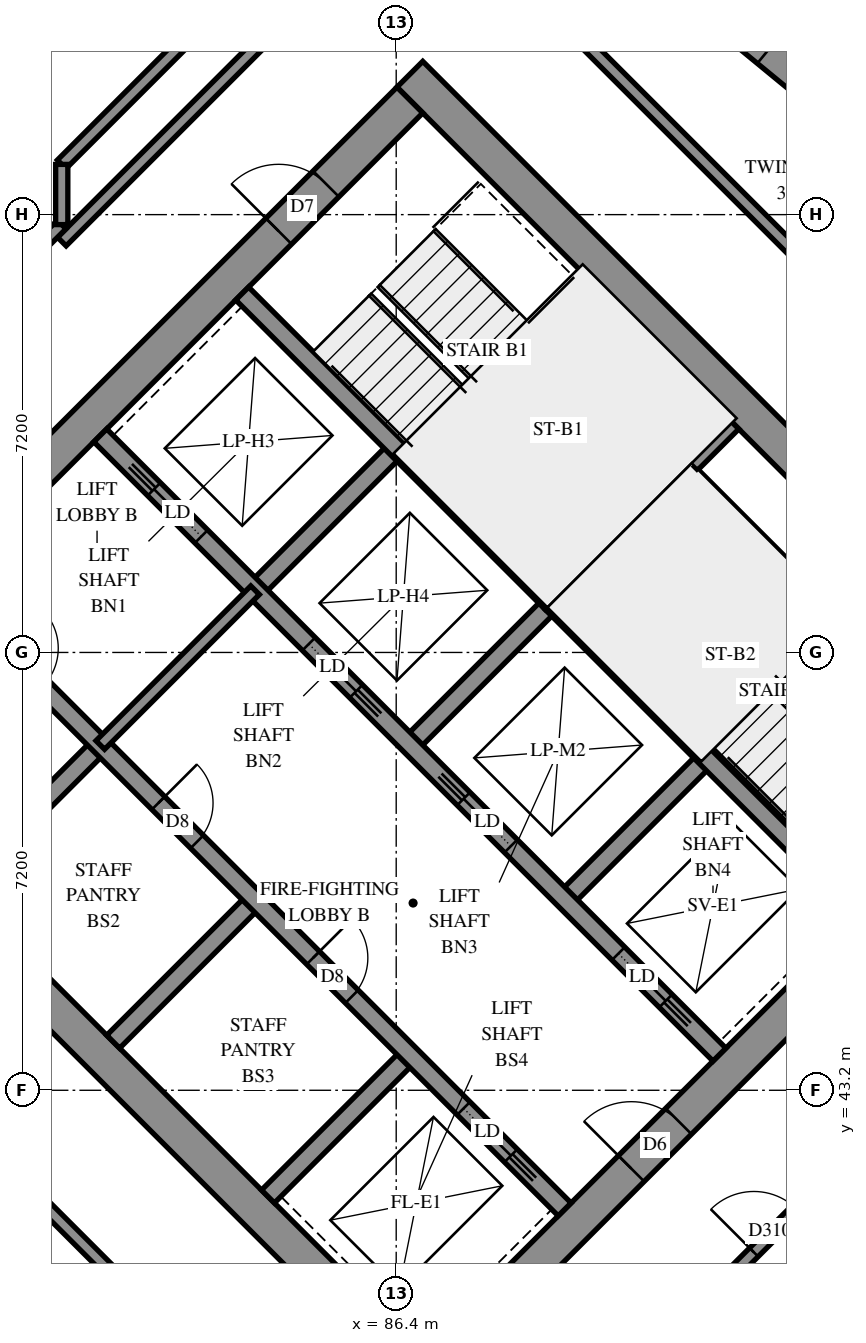
"""IFC4 building model, lengths in metres.
Left out: names, types, materials, properties, quantities, classifications, styles, units other than length and angle.
Written with IfcOpenShell. Run it as: python <this file> out.ifc"""

import sys

from ifc_helpers import new_model, si_unit, direction, frame, frame_2d, origin, place, context, subcontext, project, spatial, polyline, rectangle, outline, extrude, element, fill, save


model = new_model("IFC4")
c1 = context("Model", 3, precision=1e-05, world=origin(), true_north=direction((0.0, 1.0)))
c2 = subcontext(c1, "Body", "Model", "MODEL_VIEW")
j1 = project(units=[si_unit("LENGTHUNIT", "METRE"), si_unit("PLANEANGLEUNIT", "RADIAN")], contexts=[c1])
p1 = place(None, origin())
s1 = spatial("IfcSite", under=j1, at=p1, CompositionType="ELEMENT")
p2 = place(p1, origin())
s2 = spatial("IfcBuilding", under=s1, at=p2, CompositionType="ELEMENT")
p3 = place(p2, frame((0.0, 0.0, 138.8)))
s3 = spatial("IfcBuildingStorey", under=s2, at=p3, CompositionType="ELEMENT", Elevation=138.8)
p4 = place(p3, frame((76.018, 49.302, -0.3), z_axis=(0.0, 0.0, 1.0), x_axis=(0.7071067812, -0.7071067812, 0.0)))
e1 = element("IfcWall", 1, at=p4, inside=s3, PredefinedType="SHEAR", context=c2, shape_type="SweptSolid", body=[
    extrude(rectangle(XDim=15.6, YDim=0.6, at=frame_2d((7.8, 0.0))), origin(), (0.0, 0.0, 1.0), 2.7),
])
p5 = place(p3, frame((86.625, 59.908, -0.3), z_axis=(0.0, 0.0, 1.0), x_axis=(0.7071067812, -0.7071067812, 0.0)))
e2 = element("IfcWall", 2, at=p5, inside=s3, PredefinedType="SHEAR", context=c2, shape_type="SweptSolid", body=[
    extrude(rectangle(XDim=15.6, YDim=0.6, at=frame_2d((7.8, 0.0))), origin(), (0.0, 0.0, 1.0), 2.7),
])
p6 = place(p5, frame((10.6, 0.0, 0.3)))
e3 = element("IfcOpeningElement", 3, at=p6, cuts=e2, PredefinedType="OPENING", context=c2, shape_type="SweptSolid", body=[
    extrude(rectangle(XDim=0.8, YDim=2.1, at=frame_2d((0.4, 1.05))), frame((0.0, 0.31, 0.0), z_axis=(0.0, -1.0, 0.0), x_axis=(1.0, 0.0, 0.0)), (0.0, 0.0, 1.0), 0.62),
])
p7 = place(p3, frame((76.442, 49.302, -0.3), z_axis=(0.0, 0.0, 1.0), x_axis=(0.7071067812, 0.7071067812, 0.0)))
e4 = element("IfcWall", 4, at=p7, inside=s3, PredefinedType="SHEAR", context=c2, shape_type="SweptSolid", body=[
    extrude(rectangle(XDim=14.4, YDim=0.6, at=frame_2d((7.2, 0.0))), origin(), (0.0, 0.0, 1.0), 2.7),
])
p8 = place(p7, frame((4.55, 0.0, 0.3)))
e5 = element("IfcOpeningElement", 5, at=p8, cuts=e4, PredefinedType="OPENING", context=c2, shape_type="SweptSolid", body=[
    extrude(rectangle(XDim=1.1, YDim=2.1, at=frame_2d((0.55, 1.05))), frame((0.0, 0.31, 0.0), z_axis=(0.0, -1.0, 0.0), x_axis=(1.0, 0.0, 0.0)), (0.0, 0.0, 1.0), 0.62),
])
p9 = place(p7, frame((11.35, 0.0, 0.3)))
e6 = element("IfcOpeningElement", 6, at=p9, cuts=e4, PredefinedType="OPENING", context=c2, shape_type="SweptSolid", body=[
    extrude(rectangle(XDim=1.1, YDim=2.1, at=frame_2d((0.55, 1.05))), frame((0.0, 0.31, 0.0), z_axis=(0.0, -1.0, 0.0), x_axis=(1.0, 0.0, 0.0)), (0.0, 0.0, 1.0), 0.62),
])
p10 = place(p3, frame((87.049, 38.695, -0.3), z_axis=(0.0, 0.0, 1.0), x_axis=(0.7071067812, 0.7071067812, 0.0)))
e7 = element("IfcWall", 7, at=p10, inside=s3, PredefinedType="SHEAR", context=c2, shape_type="SweptSolid", body=[
    extrude(rectangle(XDim=14.4, YDim=0.6, at=frame_2d((7.2, 0.0))), origin(), (0.0, 0.0, 1.0), 2.7),
])
p11 = place(p10, frame((4.55, 0.0, 0.3)))
e8 = element("IfcOpeningElement", 8, at=p11, cuts=e7, PredefinedType="OPENING", context=c2, shape_type="SweptSolid", body=[
    extrude(rectangle(XDim=1.1, YDim=2.1, at=frame_2d((0.55, 1.05))), frame((0.0, 0.31, 0.0), z_axis=(0.0, -1.0, 0.0), x_axis=(1.0, 0.0, 0.0)), (0.0, 0.0, 1.0), 0.62),
])
p12 = place(p10, frame((11.35, 0.0, 0.3)))
e9 = element("IfcOpeningElement", 9, at=p12, cuts=e7, PredefinedType="OPENING", context=c2, shape_type="SweptSolid", body=[
    extrude(rectangle(XDim=1.1, YDim=2.1, at=frame_2d((0.55, 1.05))), frame((0.0, 0.31, 0.0), z_axis=(0.0, -1.0, 0.0), x_axis=(1.0, 0.0, 0.0)), (0.0, 0.0, 1.0), 0.62),
])
for number, where, z_axis, x_axis in (
    (10, (79.2, 46.544, 0.0), (0.0, 0.0, 1.0), (0.707, 0.707, 0.0)),
    (11, (84.079, 51.423, 0.0), (0.0, 0.0, 1.0), (0.707, 0.707, 0.0)),
):
    element("IfcWall", number, at=place(p3, frame(where, z_axis=z_axis, x_axis=x_axis)), inside=s3, PredefinedType="SOLIDWALL", context=c2, shape_type="SweptSolid", body=[
        extrude(rectangle(XDim=3.3, YDim=0.3, at=frame_2d((1.65, 0.0))), origin(), (0.0, 0.0, 1.0), 3.1),
    ])
p13 = place(p3, frame((81.746, 43.999, 0.0), z_axis=(0.0, 0.0, 1.0), x_axis=(0.7071067812, 0.7071067812, 0.0)))
e12 = element("IfcWall", 12, at=p13, inside=s3, PredefinedType="SOLIDWALL", context=c2, shape_type="SweptSolid", body=[
    extrude(rectangle(XDim=3.3, YDim=0.3, at=frame_2d((1.65, 0.0))), origin(), (0.0, 0.0, 1.0), 3.1),
])
p14 = place(p3, frame((86.625, 48.878, 0.0), z_axis=(0.0, 0.0, 1.0), x_axis=(0.7071067812, 0.7071067812, 0.0)))
e13 = element("IfcWall", 13, at=p14, inside=s3, PredefinedType="SOLIDWALL", context=c2, shape_type="SweptSolid", body=[
    extrude(rectangle(XDim=3.3, YDim=0.3, at=frame_2d((1.65, 0.0))), origin(), (0.0, 0.0, 1.0), 3.1),
])
p15 = place(p3, frame((84.291, 41.453, 0.0), z_axis=(0.0, 0.0, 1.0), x_axis=(0.7071067812, 0.7071067812, 0.0)))
e14 = element("IfcWall", 14, at=p15, inside=s3, PredefinedType="SOLIDWALL", context=c2, shape_type="SweptSolid", body=[
    extrude(rectangle(XDim=3.3, YDim=0.3, at=frame_2d((1.65, 0.0))), origin(), (0.0, 0.0, 1.0), 3.1),
])
p16 = place(p3, frame((89.17, 46.332, 0.0), z_axis=(0.0, 0.0, 1.0), x_axis=(0.7071067812, 0.7071067812, 0.0)))
e15 = element("IfcWall", 15, at=p16, inside=s3, PredefinedType="SOLIDWALL", context=c2, shape_type="SweptSolid", body=[
    extrude(rectangle(XDim=3.3, YDim=0.3, at=frame_2d((1.65, 0.0))), origin(), (0.0, 0.0, 1.0), 3.1),
])
p17 = place(p3, frame((78.988, 51.423, 0.0), z_axis=(0.0, 0.0, 1.0), x_axis=(0.7071067812, -0.7071067812, 0.0)))
e16 = element("IfcWall", 16, at=p17, inside=s3, PredefinedType="SOLIDWALL", context=c2, shape_type="SweptSolid", body=[
    extrude(rectangle(XDim=14.4, YDim=0.3, at=frame_2d((7.2, 0.0))), origin(), (0.0, 0.0, 1.0), 3.1),
])
p18 = place(p17, frame((1.35, 0.0, 0.0)))
e17 = element("IfcOpeningElement", 17, at=p18, cuts=e16, PredefinedType="OPENING", context=c2, shape_type="SweptSolid", body=[
    extrude(rectangle(XDim=0.9, YDim=2.1, at=frame_2d((0.45, 1.05))), frame((0.0, 0.16, 0.0), z_axis=(0.0, -1.0, 0.0), x_axis=(1.0, 0.0, 0.0)), (0.0, 0.0, 1.0), 0.32),
])
p19 = place(p17, frame((4.95, 0.0, 0.0)))
e18 = element("IfcOpeningElement", 18, at=p19, cuts=e16, PredefinedType="OPENING", context=c2, shape_type="SweptSolid", body=[
    extrude(rectangle(XDim=0.9, YDim=2.1, at=frame_2d((0.45, 1.05))), frame((0.0, 0.16, 0.0), z_axis=(0.0, -1.0, 0.0), x_axis=(1.0, 0.0, 0.0)), (0.0, 0.0, 1.0), 0.32),
])
p20 = place(p17, frame((8.55, 0.0, 0.0)))
e19 = element("IfcOpeningElement", 19, at=p20, cuts=e16, PredefinedType="OPENING", context=c2, shape_type="SweptSolid", body=[
    extrude(rectangle(XDim=0.9, YDim=2.1, at=frame_2d((0.45, 1.05))), frame((0.0, 0.16, 0.0), z_axis=(0.0, -1.0, 0.0), x_axis=(1.0, 0.0, 0.0)), (0.0, 0.0, 1.0), 0.32),
])
p21 = place(p17, frame((12.05, 0.0, 0.0)))
e20 = element("IfcOpeningElement", 20, at=p21, cuts=e16, PredefinedType="OPENING", context=c2, shape_type="SweptSolid", body=[
    extrude(rectangle(XDim=1.1, YDim=2.1, at=frame_2d((0.55, 1.05))), frame((0.0, 0.16, 0.0), z_axis=(0.0, -1.0, 0.0), x_axis=(1.0, 0.0, 0.0)), (0.0, 0.0, 1.0), 0.32),
])
p22 = place(p3, frame((81.534, 53.969, 0.0), z_axis=(0.0, 0.0, 1.0), x_axis=(0.707103309, -0.7071102534, 0.0)))
e21 = element("IfcWall", 21, at=p22, inside=s3, PredefinedType="SOLIDWALL", context=c2, shape_type="SweptSolid", body=[
    extrude(rectangle(XDim=14.4, YDim=0.3, at=frame_2d((7.2, 0.0))), origin(), (0.0, 0.0, 1.0), 3.1),
])
p23 = place(p22, frame((1.25, 0.0, 0.0)))
e22 = element("IfcOpeningElement", 22, at=p23, cuts=e21, PredefinedType="OPENING", context=c2, shape_type="SweptSolid", body=[
    extrude(rectangle(XDim=1.1, YDim=2.1, at=frame_2d((0.55, 1.05))), frame((0.0, 0.16, 0.0), z_axis=(0.0, -1.0, 0.0), x_axis=(1.0, 0.0, 0.0)), (0.0, 0.0, 1.0), 0.32),
])
p24 = place(p22, frame((4.85, 0.0, 0.0)))
e23 = element("IfcOpeningElement", 23, at=p24, cuts=e21, PredefinedType="OPENING", context=c2, shape_type="SweptSolid", body=[
    extrude(rectangle(XDim=1.1, YDim=2.1, at=frame_2d((0.55, 1.05))), frame((0.0, 0.16, 0.0), z_axis=(0.0, -1.0, 0.0), x_axis=(1.0, 0.0, 0.0)), (0.0, 0.0, 1.0), 0.32),
])
p25 = place(p22, frame((8.45, 0.0, 0.0)))
e24 = element("IfcOpeningElement", 24, at=p25, cuts=e21, PredefinedType="OPENING", context=c2, shape_type="SweptSolid", body=[
    extrude(rectangle(XDim=1.1, YDim=2.1, at=frame_2d((0.55, 1.05))), frame((0.0, 0.16, 0.0), z_axis=(0.0, -1.0, 0.0), x_axis=(1.0, 0.0, 0.0)), (0.0, 0.0, 1.0), 0.32),
])
p26 = place(p22, frame((12.05, 0.0, 0.0)))
e25 = element("IfcOpeningElement", 25, at=p26, cuts=e21, PredefinedType="OPENING", context=c2, shape_type="SweptSolid", body=[
    extrude(rectangle(XDim=1.1, YDim=2.1, at=frame_2d((0.55, 1.05))), frame((0.0, 0.16, 0.0), z_axis=(0.0, -1.0, 0.0), x_axis=(1.0, 0.0, 0.0)), (0.0, 0.0, 1.0), 0.32),
])
for number, where, z_axis, x_axis in (
    (26, (83.867, 56.302, 0.0), (0.0, 0.0, 1.0), (0.707, -0.707, 0.0)),
    (27, (88.958, 51.211, 0.0), (0.0, 0.0, 1.0), (0.707, -0.707, 0.0)),
):
    element("IfcWall", number, at=place(p3, frame(where, z_axis=z_axis, x_axis=x_axis)), inside=s3, PredefinedType="SOLIDWALL", context=c2, shape_type="SweptSolid", body=[
        extrude(rectangle(XDim=7.2, YDim=0.3, at=frame_2d((3.6, 0.0))), origin(), (0.0, 0.0, 1.0), 3.1),
    ])
p27 = place(p3, frame((88.958, 51.211, 0.0), z_axis=(0.0, 0.0, 1.0), x_axis=(0.7071067812, 0.7071067812, 0.0)))
e28 = element("IfcWall", 28, at=p27, inside=s3, PredefinedType="SOLIDWALL", context=c2, shape_type="SweptSolid", body=[
    extrude(rectangle(XDim=4.2, YDim=0.3, at=frame_2d((2.1, 0.0))), origin(), (0.0, 0.0, 1.0), 3.1),
])
p28 = place(p3, frame((93.793, 59.215, 0.0), z_axis=(0.0, 0.0, 1.0), x_axis=(-0.7725898055, 0.6349054988, 0.0)))
e29 = element("IfcWall", 29, at=p28, inside=s3, PredefinedType="SOLIDWALL", context=c2, shape_type="SweptSolid", body=[
    extrude(outline(polyline([(-0.025, -0.25), (3.365, -0.25), (3.414, 0.25), (0.025, 0.25), (-0.025, -0.25)])), origin(), (0.0, 0.0, 1.0), 3.1),
])
p29 = place(p28, frame((1.677, 0.0, 0.45)))
e30 = element("IfcOpeningElement", 30, at=p29, cuts=e29, PredefinedType="OPENING", context=c2, shape_type="SweptSolid", body=[
    extrude(rectangle(XDim=1.2, YDim=2.5, at=frame_2d((0.6, 1.25))), frame((0.0, 0.26, 0.0), z_axis=(0.0, -1.0, 0.0), x_axis=(1.0, 0.0, 0.0)), (0.0, 0.0, 1.0), 0.52),
])
p30 = place(p3, frame((91.313, 53.354, 0.0), z_axis=(0.0, 0.0, 1.0), x_axis=(0.7071140275, -0.7070995348, 0.0)))
e31 = element("IfcWall", 31, at=p30, inside=s3, PredefinedType="PARTITIONING", context=c2, shape_type="SweptSolid", body=[
    extrude(rectangle(XDim=6.9, YDim=0.15, at=frame_2d((3.45, 0.0))), origin(), (0.0, 0.0, 1.0), 3.1),
])
p31 = place(p3, frame((81.534, 48.878, 0.0), z_axis=(0.0, 0.0, 1.0), x_axis=(0.707092892, 0.7071206701, 0.0)))
e32 = element("IfcWall", 32, at=p31, inside=s3, PredefinedType="PARTITIONING", context=c2, shape_type="SweptSolid", body=[
    extrude(rectangle(XDim=3.6, YDim=0.2, at=frame_2d((1.8, 0.0))), origin(), (0.0, 0.0, 1.0), 3.1),
])
p32 = place(p3, frame((86.331, 33.312, 0.0), z_axis=(0.0, 0.0, 1.0), x_axis=(0.7071067812, 0.7071067812, 0.0)))
e33 = element("IfcWall", 33, at=p32, inside=s3, PredefinedType="PARTITIONING", context=c2, shape_type="SweptSolid", body=[
    extrude(rectangle(XDim=10.514, YDim=0.2, at=frame_2d((5.257, 0.0))), origin(), (0.0, 0.0, 1.0), 3.1),
])
p33 = place(p3, frame((88.326, 61.609, 0.0), z_axis=(0.0, 0.0, 1.0), x_axis=(0.7071067812, -0.7071067812, 0.0)))
e34 = element("IfcWall", 34, at=p33, inside=s3, PredefinedType="PARTITIONING", context=c2, shape_type="SweptSolid", body=[
    extrude(rectangle(XDim=10.14, YDim=0.2, at=frame_2d((5.07, 0.0))), origin(), (0.0, 0.0, 1.0), 3.1),
])
p34 = place(p33, frame((8.535, 0.0, 0.0)))
e35 = element("IfcOpeningElement", 35, at=p34, cuts=e34, PredefinedType="OPENING", context=c2, shape_type="SweptSolid", body=[
    extrude(rectangle(XDim=0.9, YDim=2.1, at=frame_2d((0.45, 1.05))), frame((0.0, 0.11, 0.0), z_axis=(0.0, -1.0, 0.0), x_axis=(1.0, 0.0, 0.0)), (0.0, 0.0, 1.0), 0.22),
])
p35 = place(p3, frame((80.899, 58.427, 0.0), z_axis=(0.0, 0.0, 1.0), x_axis=(0.7071121886, 0.7071013737, 0.0)))
e36 = element("IfcWall", 36, at=p35, inside=s3, PredefinedType="PARTITIONING", context=c2, shape_type="SweptSolid", body=[
    extrude(rectangle(XDim=9.246, YDim=0.2, at=frame_2d((4.623, 0.0))), origin(), (0.0, 0.0, 1.0), 3.1),
])
p36 = place(p3, frame((80.423, 41.497, 0.0), z_axis=(0.0, 0.0, 1.0), x_axis=(0.7071067812, -0.7071067812, 0.0)))
e37 = element("IfcWall", 37, at=p36, inside=s3, PredefinedType="PARTITIONING", context=c2, shape_type="SweptSolid", body=[
    extrude(rectangle(XDim=9.065, YDim=0.2, at=frame_2d((4.532, 0.0))), origin(), (0.0, 0.0, 1.0), 3.1),
])
p37 = place(p3, frame((86.837, 35.091, 0.0), z_axis=(0.0, 0.0, 1.0), x_axis=(0.7071067812, 0.7071067812, 0.0)))
e38 = element("IfcWall", 38, at=p37, inside=s3, PredefinedType="PARTITIONING", context=c2, shape_type="SweptSolid", body=[
    extrude(rectangle(XDim=8.898, YDim=0.2, at=frame_2d((4.449, 0.0))), origin(), (0.0, 0.0, 1.0), 3.1),
])
p38 = place(p37, frame((7.7, 0.0, 0.0)))
e39 = element("IfcOpeningElement", 39, at=p38, cuts=e38, PredefinedType="OPENING", context=c2, shape_type="SweptSolid", body=[
    extrude(rectangle(XDim=1.0, YDim=2.1, at=frame_2d((0.5, 1.05))), frame((0.0, 0.11, 0.0), z_axis=(0.0, -1.0, 0.0), x_axis=(1.0, 0.0, 0.0)), (0.0, 0.0, 1.0), 0.22),
])
p39 = place(p3, frame((80.901, 57.157, 0.0), z_axis=(0.0, 0.0, 1.0), x_axis=(0.7071067812, 0.7071067812, 0.0)))
e40 = element("IfcWall", 40, at=p39, inside=s3, PredefinedType="PARTITIONING", context=c2, shape_type="SweptSolid", body=[
    extrude(rectangle(XDim=8.392, YDim=0.2, at=frame_2d((4.196, 0.0))), origin(), (0.0, 0.0, 1.0), 3.1),
])
p40 = place(p3, frame((79.801, 56.339, 0.0), z_axis=(0.0, 0.0, 1.0), x_axis=(0.7071067812, 0.7071067812, 0.0)))
e41 = element("IfcWall", 41, at=p40, inside=s3, PredefinedType="PARTITIONING", context=c2, shape_type="SweptSolid", body=[
    extrude(rectangle(XDim=1.553, YDim=0.2, at=frame_2d((0.776, 0.0))), origin(), (0.0, 0.0, 1.0), 3.1),
])
p41 = place(p3, frame((80.9, 57.436, 0.0), z_axis=(0.0, 0.0, 1.0), x_axis=(0.0, 1.0, 0.0)))
e42 = element("IfcWall", 42, at=p41, inside=s3, PredefinedType="PARTITIONING", context=c2, shape_type="SweptSolid", body=[
    extrude(rectangle(XDim=0.99, YDim=0.2, at=frame_2d((0.495, 0.0))), origin(), (0.0, 0.0, 1.0), 3.1),
])
p42 = place(p29, origin())
e43 = element("IfcWindow", 43, at=p42, inside=s3, PartitioningType="SINGLE_PANEL", PredefinedType="WINDOW", context=c2, shape_type="SweptSolid", body=[
    extrude(rectangle(XDim=1.2, YDim=2.5, at=frame_2d((0.6, 1.25))), frame((0.0, 0.18, 0.0), z_axis=(0.0, -1.0, 0.0), x_axis=(1.0, 0.0, 0.0)), (0.0, 0.0, 1.0), 0.06),
])
fill(e30, e43)
p43 = place(p11, origin())
e44 = element("IfcDoor", 44, at=p43, inside=s3, OperationType="DOUBLE_DOOR_SINGLE_SWING", PredefinedType="DOOR", context=c2, shape_type="SweptSolid", body=[
    extrude(rectangle(XDim=1.1, YDim=2.1, at=frame_2d((0.55, 1.05))), frame((0.0, 0.025, 0.0), z_axis=(0.0, -1.0, 0.0), x_axis=(1.0, 0.0, 0.0)), (0.0, 0.0, 1.0), 0.05),
])
fill(e8, e44)
p44 = place(p9, origin())
e45 = element("IfcDoor", 45, at=p44, inside=s3, OperationType="SINGLE_SWING_LEFT", PredefinedType="DOOR", context=c2, shape_type="SweptSolid", body=[
    extrude(rectangle(XDim=1.1, YDim=2.1, at=frame_2d((0.55, 1.05))), frame((0.0, 0.025, 0.0), z_axis=(0.0, -1.0, 0.0), x_axis=(1.0, 0.0, 0.0)), (0.0, 0.0, 1.0), 0.05),
])
fill(e6, e45)
p45 = place(p19, origin())
e46 = element("IfcDoor", 46, at=p45, inside=s3, OperationType="SINGLE_SWING_LEFT", PredefinedType="DOOR", context=c2, shape_type="SweptSolid", body=[
    extrude(rectangle(XDim=0.9, YDim=2.1, at=frame_2d((0.45, 1.05))), frame((0.0, 0.025, 0.0), z_axis=(0.0, -1.0, 0.0), x_axis=(1.0, 0.0, 0.0)), (0.0, 0.0, 1.0), 0.05),
])
fill(e18, e46)
p46 = place(p20, origin())
e47 = element("IfcDoor", 47, at=p46, inside=s3, OperationType="SINGLE_SWING_LEFT", PredefinedType="DOOR", context=c2, shape_type="SweptSolid", body=[
    extrude(rectangle(XDim=0.9, YDim=2.1, at=frame_2d((0.45, 1.05))), frame((0.0, 0.025, 0.0), z_axis=(0.0, -1.0, 0.0), x_axis=(1.0, 0.0, 0.0)), (0.0, 0.0, 1.0), 0.05),
])
fill(e19, e47)
p47 = place(p21, origin())
e48 = element("IfcDoor", 48, at=p47, inside=s3, OperationType="SLIDING_TO_RIGHT", PredefinedType="DOOR", context=c2, shape_type="SweptSolid", body=[
    extrude(rectangle(XDim=1.1, YDim=2.1, at=frame_2d((0.55, 1.05))), frame((0.0, 0.025, 0.0), z_axis=(0.0, -1.0, 0.0), x_axis=(1.0, 0.0, 0.0)), (0.0, 0.0, 1.0), 0.05),
])
fill(e20, e48)
p48 = place(p23, origin())
e49 = element("IfcDoor", 49, at=p48, inside=s3, OperationType="SLIDING_TO_LEFT", PredefinedType="DOOR", context=c2, shape_type="SweptSolid", body=[
    extrude(rectangle(XDim=1.1, YDim=2.1, at=frame_2d((0.55, 1.05))), frame((0.0, 0.025, 0.0), z_axis=(0.0, -1.0, 0.0), x_axis=(1.0, 0.0, 0.0)), (0.0, 0.0, 1.0), 0.05),
])
fill(e22, e49)
p49 = place(p24, origin())
e50 = element("IfcDoor", 50, at=p49, inside=s3, OperationType="SLIDING_TO_RIGHT", PredefinedType="DOOR", context=c2, shape_type="SweptSolid", body=[
    extrude(rectangle(XDim=1.1, YDim=2.1, at=frame_2d((0.55, 1.05))), frame((0.0, 0.025, 0.0), z_axis=(0.0, -1.0, 0.0), x_axis=(1.0, 0.0, 0.0)), (0.0, 0.0, 1.0), 0.05),
])
fill(e23, e50)
p50 = place(p25, origin())
e51 = element("IfcDoor", 51, at=p50, inside=s3, OperationType="SLIDING_TO_LEFT", PredefinedType="DOOR", context=c2, shape_type="SweptSolid", body=[
    extrude(rectangle(XDim=1.1, YDim=2.1, at=frame_2d((0.55, 1.05))), frame((0.0, 0.025, 0.0), z_axis=(0.0, -1.0, 0.0), x_axis=(1.0, 0.0, 0.0)), (0.0, 0.0, 1.0), 0.05),
])
fill(e24, e51)
p51 = place(p26, origin())
e52 = element("IfcDoor", 52, at=p51, inside=s3, OperationType="SLIDING_TO_RIGHT", PredefinedType="DOOR", context=c2, shape_type="SweptSolid", body=[
    extrude(rectangle(XDim=1.1, YDim=2.1, at=frame_2d((0.55, 1.05))), frame((0.0, 0.025, 0.0), z_axis=(0.0, -1.0, 0.0), x_axis=(1.0, 0.0, 0.0)), (0.0, 0.0, 1.0), 0.05),
])
fill(e25, e52)
p52 = place(p38, origin())
e53 = element("IfcDoor", 53, at=p52, inside=s3, OperationType="SINGLE_SWING_LEFT", PredefinedType="DOOR", context=c2, shape_type="SweptSolid", body=[
    extrude(rectangle(XDim=1.0, YDim=2.1, at=frame_2d((0.5, 1.05))), frame((0.0, 0.025, 0.0), z_axis=(0.0, -1.0, 0.0), x_axis=(1.0, 0.0, 0.0)), (0.0, 0.0, 1.0), 0.05),
])
fill(e39, e53)
save(model, sys.argv[1])
